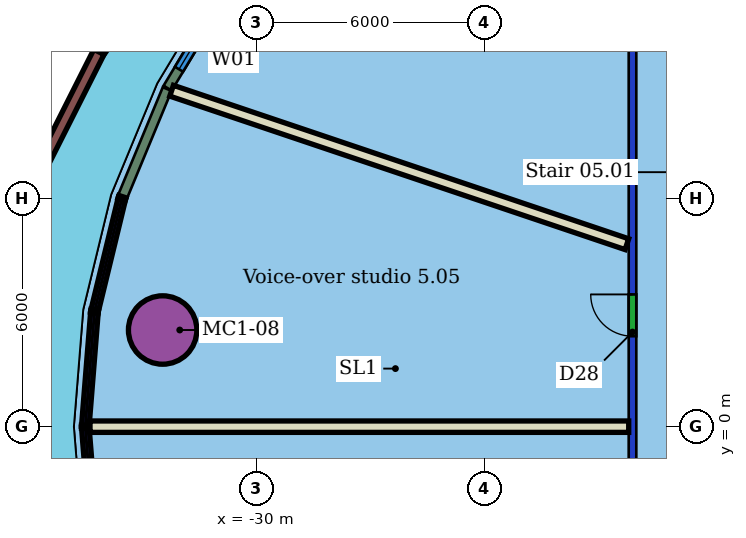
"""IFC4 building model, lengths in metres.
Left out: names, types, materials, properties, quantities, classifications, styles, units other than length and angle.
Written with IfcOpenShell. Run it as: python <this file> out.ifc"""

import sys

from ifc_helpers import new_model, si_unit, direction, frame, frame_2d, origin, origin_2d, place, context, subcontext, project, spatial, rectangle, hollow_circle, extrude, element, fill, save


model = new_model("IFC4")
c1 = context("Model", 3, precision=1e-05, world=origin(), true_north=direction((0.0, 1.0)))
c2 = subcontext(c1, "Body", "Model", "MODEL_VIEW")
j1 = project(units=[si_unit("LENGTHUNIT", "METRE"), si_unit("PLANEANGLEUNIT", "RADIAN")], contexts=[c1])
p1 = place(None, origin())
s1 = spatial("IfcSite", under=j1, at=p1, CompositionType="ELEMENT")
p2 = place(p1, origin())
s2 = spatial("IfcBuilding", under=s1, at=p2, CompositionType="ELEMENT")
p3 = place(p2, frame((0.0, 0.0, 36.0)))
s3 = spatial("IfcBuildingStorey", under=s2, at=p3, CompositionType="ELEMENT", Elevation=36.0)
p4 = place(p3, frame((-32.464, 2.543, 0.0), z_axis=(0.0, 0.0, 1.0), x_axis=(1.0, 0.0, 0.0)))
e1 = element("IfcColumn", 1, at=p4, inside=s3, PredefinedType="COLUMN", context=c2, shape_type="SweptSolid", body=[
    extrude(hollow_circle(Radius=0.9, WallThickness=0.06, at=origin_2d()), origin(), (0.0, 0.0, 1.0), 3.55),
])
p5 = place(p3, frame((-20.1, -11.0, 0.0), z_axis=(0.0, 0.0, 1.0), x_axis=(0.0, 1.0, 0.0)))
e2 = element("IfcWall", 2, at=p5, inside=s3, PredefinedType="PARTITIONING", context=c2, shape_type="SweptSolid", body=[
    extrude(rectangle(XDim=22.0, YDim=0.2, at=frame_2d((11.0, 0.0))), origin(), (0.0, 0.0, 1.0), 2.85),
])
p6 = place(p5, frame((13.38, 0.0, 0.0)))
e3 = element("IfcOpeningElement", 3, at=p6, cuts=e2, PredefinedType="OPENING", context=c2, shape_type="SweptSolid", body=[
    extrude(rectangle(XDim=1.1, YDim=2.1, at=frame_2d((0.55, 1.05))), frame((0.0, 0.11, 0.0), z_axis=(0.0, -1.0, 0.0), x_axis=(1.0, 0.0, 0.0)), (0.0, 0.0, 1.0), 0.22),
])
p7 = place(p5, frame((6.18, 0.0, 0.0)))
e4 = element("IfcOpeningElement", 4, at=p7, cuts=e2, PredefinedType="OPENING", context=c2, shape_type="SweptSolid", body=[
    extrude(rectangle(XDim=1.8, YDim=2.1, at=frame_2d((0.9, 1.05))), frame((0.0, 0.11, 0.0), z_axis=(0.0, -1.0, 0.0), x_axis=(1.0, 0.0, 0.0)), (0.0, 0.0, 1.0), 0.22),
])
p8 = place(p3, frame((-32.229, 8.84, 0.0), z_axis=(0.0, 0.0, 1.0), x_axis=(0.947633412756, -0.319360165063, 0.0)))
e5 = element("IfcWall", 5, at=p8, inside=s3, PredefinedType="PARTITIONING", context=c2, shape_type="SweptSolid", body=[
    extrude(rectangle(XDim=12.643, YDim=0.3, at=frame_2d((6.321, 0.0))), origin(), (0.0, 0.0, 1.0), 3.55),
])
p9 = place(p3, frame((-34.375, 0.0, 0.0), z_axis=(0.0, 0.0, 1.0), x_axis=(1.0, 0.0, 0.0)))
e6 = element("IfcWall", 6, at=p9, inside=s3, PredefinedType="PARTITIONING", context=c2, shape_type="SweptSolid", body=[
    extrude(rectangle(XDim=14.175, YDim=0.3, at=frame_2d((7.087, 0.0))), origin(), (0.0, 0.0, 1.0), 3.55),
])
p10 = place(p3, frame((-30.703, 11.616, 0.0), z_axis=(0.0, 0.0, 1.0), x_axis=(-0.51563096518, -0.856810777096, 0.0)))
e7 = element("IfcWall", 7, at=p10, inside=s3, PredefinedType="SOLIDWALL", context=c2, shape_type="SweptSolid", body=[
    extrude(rectangle(XDim=3.161, YDim=0.25, at=frame_2d((1.581, 0.0))), origin(), (0.0, 0.0, 1.0), 3.15),
])
p11 = place(p10, frame((0.581, 0.0, 0.8)))
e8 = element("IfcOpeningElement", 8, at=p11, cuts=e7, PredefinedType="OPENING", context=c2, shape_type="SweptSolid", body=[
    extrude(rectangle(XDim=2.0, YDim=2.2, at=frame_2d((1.0, 1.1))), frame((0.0, 0.135, 0.0), z_axis=(0.0, -1.0, 0.0), x_axis=(1.0, 0.0, 0.0)), (0.0, 0.0, 1.0), 0.27),
])
p12 = place(p3, frame((-32.345, 8.884, 0.0), z_axis=(0.0, 0.0, 1.0), x_axis=(-0.382665181283, -0.923887092146, 0.0)))
e9 = element("IfcWall", 9, at=p12, inside=s3, PredefinedType="SOLIDWALL", context=c2, shape_type="SweptSolid", body=[
    extrude(rectangle(XDim=3.05, YDim=0.25, at=frame_2d((1.525, 0.0))), origin(), (0.0, 0.0, 1.0), 3.15),
])
p13 = place(p3, frame((-31.922, 12.894, 0.0), z_axis=(0.0, 0.0, 1.0), x_axis=(-0.590742651478, -0.806860037258, 0.0)))
e10 = element("IfcWall", 10, at=p13, inside=s3, PredefinedType="PARAPET", context=c2, shape_type="SweptSolid", body=[
    extrude(rectangle(XDim=3.734, YDim=0.3, at=frame_2d((1.867, 0.0))), origin(), (0.0, 0.0, 1.0), 1.1),
])
p14 = place(p3, frame((-34.14, 9.86, 0.0), z_axis=(0.0, 0.0, 1.0), x_axis=(-0.450095618006, -0.892980366331, 0.0)))
e11 = element("IfcWall", 11, at=p14, inside=s3, PredefinedType="PARAPET", context=c2, shape_type="SweptSolid", body=[
    extrude(rectangle(XDim=3.555, YDim=0.3, at=frame_2d((1.777, 0.0))), origin(), (0.0, 0.0, 1.0), 1.1),
])
p15 = place(p6, origin())
e12 = element("IfcDoor", 12, at=p15, inside=s3, OperationType="SINGLE_SWING_RIGHT", PredefinedType="DOOR", context=c2, shape_type="SweptSolid", body=[
    extrude(rectangle(XDim=1.1, YDim=2.1, at=frame_2d((0.55, 1.05))), frame((0.0, 0.025, 0.0), z_axis=(0.0, -1.0, 0.0), x_axis=(1.0, 0.0, 0.0)), (0.0, 0.0, 1.0), 0.05),
])
fill(e3, e12)
p16 = place(p11, origin())
e13 = element("IfcWindow", 13, at=p16, inside=s3, PartitioningType="SINGLE_PANEL", PredefinedType="WINDOW", context=c2, shape_type="SweptSolid", body=[
    extrude(rectangle(XDim=2.0, YDim=2.2, at=frame_2d((1.0, 1.1))), frame((0.0, 0.03, 0.0), z_axis=(0.0, -1.0, 0.0), x_axis=(1.0, 0.0, 0.0)), (0.0, 0.0, 1.0), 0.06),
])
fill(e8, e13)
save(model, sys.argv[1])
